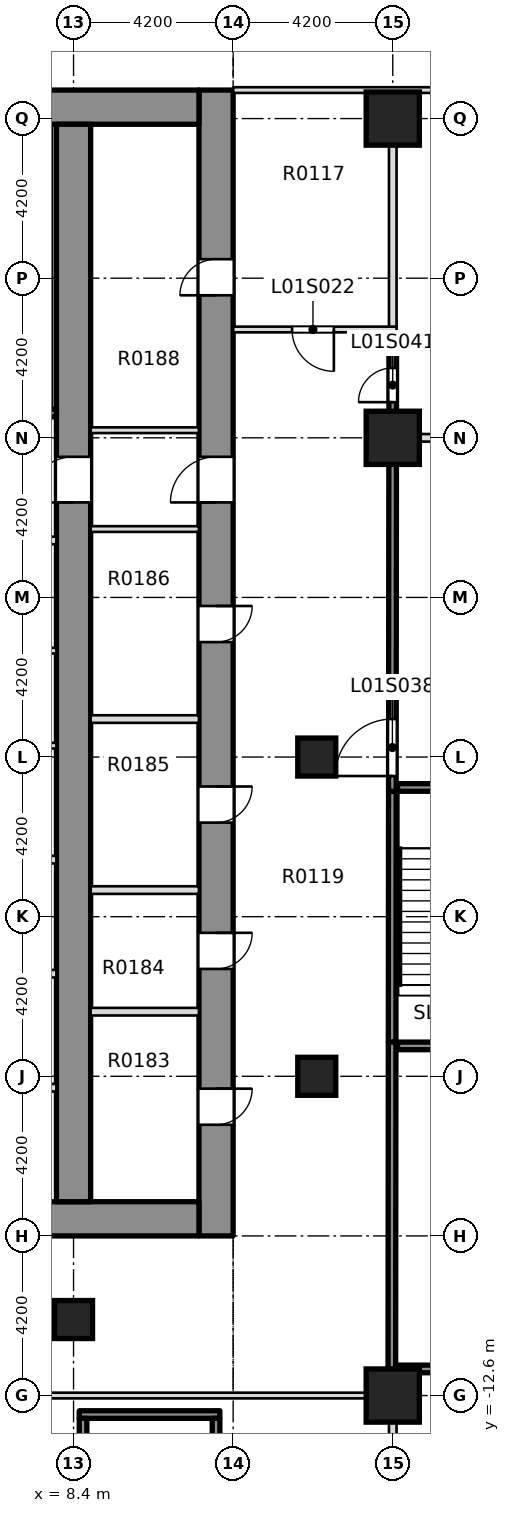
"""IFC4 building model, lengths in metres.
Left out: names, types, materials, properties, quantities, classifications, styles, units other than length and angle.
Written with IfcOpenShell. Run it as: python <this file> out.ifc"""

import sys

from ifc_helpers import new_model, si_unit, direction, frame, frame_2d, origin, origin_2d, place, context, subcontext, project, spatial, rectangle, extrude, element, fill, save


model = new_model("IFC4")
c1 = context("Model", 3, precision=1e-05, world=origin(), true_north=direction((0.0, 1.0)))
c2 = subcontext(c1, "Body", "Model", "MODEL_VIEW")
j1 = project(units=[si_unit("LENGTHUNIT", "METRE"), si_unit("PLANEANGLEUNIT", "RADIAN")], contexts=[c1])
p1 = place(None, origin())
s1 = spatial("IfcSite", under=j1, at=p1, CompositionType="ELEMENT")
p2 = place(p1, origin())
s2 = spatial("IfcBuilding", under=s1, at=p2, CompositionType="ELEMENT")
p3 = place(p2, frame((0.0, 0.0, 7.5)))
s3 = spatial("IfcBuildingStorey", under=s2, at=p3, CompositionType="ELEMENT", Elevation=7.5)
p4 = place(p3, frame((12.15, -8.4, -0.4), z_axis=(0.0, 0.0, 1.0), x_axis=(0.0, 1.0, 0.0)))
e1 = element("IfcWall", 1, at=p4, inside=s3, PredefinedType="SHEAR", context=c2, shape_type="SweptSolid", body=[
    extrude(rectangle(XDim=30.15, YDim=0.9, at=frame_2d((15.075, 0.0))), origin(), (0.0, 0.0, 1.0), 5.0),
])
p5 = place(p4, frame((2.925, 0.0, 0.4)))
e2 = element("IfcOpeningElement", 2, at=p5, cuts=e1, PredefinedType="OPENING", context=c2, shape_type="SweptSolid", body=[
    extrude(rectangle(XDim=0.95, YDim=2.1, at=frame_2d((0.475, 1.05))), frame((0.0, 0.46, 0.0), z_axis=(0.0, -1.0, 0.0), x_axis=(1.0, 0.0, 0.0)), (0.0, 0.0, 1.0), 0.92),
])
p6 = place(p4, frame((7.025, 0.0, 0.4)))
e3 = element("IfcOpeningElement", 3, at=p6, cuts=e1, PredefinedType="OPENING", context=c2, shape_type="SweptSolid", body=[
    extrude(rectangle(XDim=0.95, YDim=2.1, at=frame_2d((0.475, 1.05))), frame((0.0, 0.46, 0.0), z_axis=(0.0, -1.0, 0.0), x_axis=(1.0, 0.0, 0.0)), (0.0, 0.0, 1.0), 0.92),
])
p7 = place(p4, frame((10.875, 0.0, 0.4)))
e4 = element("IfcOpeningElement", 4, at=p7, cuts=e1, PredefinedType="OPENING", context=c2, shape_type="SweptSolid", body=[
    extrude(rectangle(XDim=0.95, YDim=2.1, at=frame_2d((0.475, 1.05))), frame((0.0, 0.46, 0.0), z_axis=(0.0, -1.0, 0.0), x_axis=(1.0, 0.0, 0.0)), (0.0, 0.0, 1.0), 0.92),
])
p8 = place(p4, frame((15.625, 0.0, 0.4)))
e5 = element("IfcOpeningElement", 5, at=p8, cuts=e1, PredefinedType="OPENING", context=c2, shape_type="SweptSolid", body=[
    extrude(rectangle(XDim=0.95, YDim=2.1, at=frame_2d((0.475, 1.05))), frame((0.0, 0.46, 0.0), z_axis=(0.0, -1.0, 0.0), x_axis=(1.0, 0.0, 0.0)), (0.0, 0.0, 1.0), 0.92),
])
p9 = place(p4, frame((24.75, 0.0, 0.4)))
e6 = element("IfcOpeningElement", 6, at=p9, cuts=e1, PredefinedType="OPENING", context=c2, shape_type="SweptSolid", body=[
    extrude(rectangle(XDim=0.95, YDim=2.1, at=frame_2d((0.475, 1.05))), frame((0.0, 0.46, 0.0), z_axis=(0.0, -1.0, 0.0), x_axis=(1.0, 0.0, 0.0)), (0.0, 0.0, 1.0), 0.92),
])
p10 = place(p4, frame((19.3, 0.0, 0.4)))
e7 = element("IfcOpeningElement", 7, at=p10, cuts=e1, PredefinedType="OPENING", context=c2, shape_type="SweptSolid", body=[
    extrude(rectangle(XDim=1.2, YDim=2.1, at=frame_2d((0.6, 1.05))), frame((0.0, 0.46, 0.0), z_axis=(0.0, -1.0, 0.0), x_axis=(1.0, 0.0, 0.0)), (0.0, 0.0, 1.0), 0.92),
])
p11 = place(p3, frame((-11.7, -7.95, -0.4), z_axis=(0.0, 0.0, 1.0), x_axis=(1.0, 0.0, 0.0)))
e8 = element("IfcWall", 8, at=p11, inside=s3, PredefinedType="SHEAR", context=c2, shape_type="SweptSolid", body=[
    extrude(rectangle(XDim=23.4, YDim=0.9, at=frame_2d((11.7, 0.0))), origin(), (0.0, 0.0, 1.0), 5.0),
])
p12 = place(p11, frame((6.95, 0.0, 0.4)))
e9 = element("IfcOpeningElement", 9, at=p12, cuts=e8, PredefinedType="OPENING", context=c2, shape_type="SweptSolid", body=[
    extrude(rectangle(XDim=1.8, YDim=2.1, at=frame_2d((0.9, 1.05))), frame((0.0, 0.46, 0.0), z_axis=(0.0, -1.0, 0.0), x_axis=(1.0, 0.0, 0.0)), (0.0, 0.0, 1.0), 0.92),
])
p13 = place(p11, frame((14.65, 0.0, 0.4)))
e10 = element("IfcOpeningElement", 10, at=p13, cuts=e8, PredefinedType="OPENING", context=c2, shape_type="SweptSolid", body=[
    extrude(rectangle(XDim=1.8, YDim=2.1, at=frame_2d((0.9, 1.05))), frame((0.0, 0.46, 0.0), z_axis=(0.0, -1.0, 0.0), x_axis=(1.0, 0.0, 0.0)), (0.0, 0.0, 1.0), 0.92),
])
p14 = place(p3, frame((-11.7, 21.3, -0.4), z_axis=(0.0, 0.0, 1.0), x_axis=(1.0, 0.0, 0.0)))
e11 = element("IfcWall", 11, at=p14, inside=s3, PredefinedType="SOLIDWALL", context=c2, shape_type="SweptSolid", body=[
    extrude(rectangle(XDim=23.4, YDim=0.9, at=frame_2d((11.7, 0.0))), origin(), (0.0, 0.0, 1.0), 5.0),
])
p15 = place(p3, frame((8.4, -7.5, -0.4), z_axis=(0.0, 0.0, 1.0), x_axis=(0.0, 1.0, 0.0)))
e12 = element("IfcWall", 12, at=p15, inside=s3, PredefinedType="SHEAR", context=c2, shape_type="SweptSolid", body=[
    extrude(rectangle(XDim=28.35, YDim=0.9, at=frame_2d((14.175, 0.0))), origin(), (0.0, 0.0, 1.0), 5.0),
])
p16 = place(p15, frame((18.4, 0.0, 0.4)))
e13 = element("IfcOpeningElement", 13, at=p16, cuts=e12, PredefinedType="OPENING", context=c2, shape_type="SweptSolid", body=[
    extrude(rectangle(XDim=1.2, YDim=2.1, at=frame_2d((0.6, 1.05))), frame((0.0, 0.46, 0.0), z_axis=(0.0, -1.0, 0.0), x_axis=(1.0, 0.0, 0.0)), (0.0, 0.0, 1.0), 0.92),
])
for number, where, z_axis, x_axis in (
    (14, (16.8, -12.6, -0.4), (0.0, 0.0, 1.0), (1.0, 0.0, 0.0)),
    (15, (16.8, 12.6, -0.4), (0.0, 0.0, 1.0), (1.0, 0.0, 0.0)),
    (16, (16.8, 21.0, -0.4), (0.0, 0.0, 1.0), (1.0, 0.0, 0.0)),
):
    element("IfcColumn", number, at=place(p3, frame(where, z_axis=z_axis, x_axis=x_axis)), inside=s3, PredefinedType="COLUMN", context=c2, shape_type="SweptSolid", body=[
        extrude(rectangle(XDim=1.4, YDim=1.4, at=origin_2d()), origin(), (0.0, 0.0, 1.0), 5.0),
    ])
for number, where, z_axis, x_axis in (
    (17, (8.4, -10.6, -0.4), (0.0, 0.0, 1.0), (1.0, 0.0, 0.0)),
    (18, (14.8, -4.2, -0.4), (0.0, 0.0, 1.0), (1.0, 0.0, 0.0)),
    (19, (14.8, 4.2, -0.4), (0.0, 0.0, 1.0), (1.0, 0.0, 0.0)),
):
    element("IfcColumn", number, at=place(p3, frame(where, z_axis=z_axis, x_axis=x_axis)), inside=s3, PredefinedType="COLUMN", context=c2, shape_type="SweptSolid", body=[
        extrude(rectangle(XDim=1.0, YDim=1.0, at=origin_2d()), origin(), (0.0, 0.0, 1.0), 5.0),
    ])
p17 = place(p3, frame((7.275, -12.6, 0.0), z_axis=(0.0, 0.0, 1.0), x_axis=(1.0, 0.0, 0.0)))
e20 = element("IfcWall", 20, at=p17, inside=s3, PredefinedType="PARTITIONING", context=c2, shape_type="SweptSolid", body=[
    extrude(rectangle(XDim=9.625, YDim=0.15, at=frame_2d((4.812, 0.0))), origin(), (0.0, 0.0, 1.0), 4.6),
])
p18 = place(p3, frame((16.875, 12.6, 0.0), z_axis=(0.0, 0.0, 1.0), x_axis=(1.0, 0.0, 0.0)))
e21 = element("IfcWall", 21, at=p18, inside=s3, PredefinedType="PARTITIONING", context=c2, shape_type="SweptSolid", body=[
    extrude(rectangle(XDim=34.075, YDim=0.2, at=frame_2d((17.038, 0.0))), origin(), (0.0, 0.0, 1.0), 4.6),
])
p19 = place(p18, frame((20.025, 0.0, 0.0)))
e22 = element("IfcOpeningElement", 22, at=p19, cuts=e21, PredefinedType="OPENING", context=c2, shape_type="SweptSolid", body=[
    extrude(rectangle(XDim=0.9, YDim=2.1, at=frame_2d((0.45, 1.05))), frame((0.0, 0.11, 0.0), z_axis=(0.0, -1.0, 0.0), x_axis=(1.0, 0.0, 0.0)), (0.0, 0.0, 1.0), 0.22),
])
p20 = place(p3, frame((12.601, 15.45, 0.0), z_axis=(0.0, 0.0, 1.0), x_axis=(1.0, 0.0, 0.0)))
e23 = element("IfcWall", 23, at=p20, inside=s3, PredefinedType="PARTITIONING", context=c2, shape_type="SweptSolid", body=[
    extrude(rectangle(XDim=4.299, YDim=0.15, at=frame_2d((2.149, 0.0))), origin(), (0.0, 0.0, 1.0), 4.6),
])
p21 = place(p20, frame((1.549, 0.0, 0.0)))
e24 = element("IfcOpeningElement", 24, at=p21, cuts=e23, PredefinedType="OPENING", context=c2, shape_type="SweptSolid", body=[
    extrude(rectangle(XDim=1.1, YDim=2.1, at=frame_2d((0.55, 1.05))), frame((0.0, 0.085, 0.0), z_axis=(0.0, -1.0, 0.0), x_axis=(1.0, 0.0, 0.0)), (0.0, 0.0, 1.0), 0.17),
])
p22 = place(p3, frame((12.601, 21.75, 0.0), z_axis=(0.0, 0.0, 1.0), x_axis=(1.0, 0.0, 0.0)))
e25 = element("IfcWall", 25, at=p22, inside=s3, PredefinedType="PARTITIONING", context=c2, shape_type="SweptSolid", body=[
    extrude(rectangle(XDim=21.074, YDim=0.15, at=frame_2d((10.537, 0.0))), origin(), (0.0, 0.0, 1.0), 4.6),
])
p23 = place(p3, frame((16.8, -18.125, 0.0), z_axis=(0.0, 0.0, 1.0), x_axis=(0.0, 1.0, 0.0)))
e26 = element("IfcWall", 26, at=p23, inside=s3, PredefinedType="PARTITIONING", context=c2, shape_type="SweptSolid", body=[
    extrude(rectangle(XDim=5.45, YDim=0.2, at=frame_2d((2.725, 0.0))), origin(), (0.0, 0.0, 1.0), 4.6),
])
p24 = place(p3, frame((16.783, -3.3, 0.0), z_axis=(0.0, 0.0, 1.0), x_axis=(0.000924761016, 0.999999572408, 0.0)))
e27 = element("IfcWall", 27, at=p24, inside=s3, PredefinedType="SOLIDWALL", context=c2, shape_type="SweptSolid", body=[
    extrude(rectangle(XDim=6.6, YDim=0.2, at=frame_2d((3.3, 0.0))), origin(), (0.0, 0.0, 1.0), 4.6),
])
p25 = place(p3, frame((16.8, 15.525, 0.0), z_axis=(0.0, 0.0, 1.0), x_axis=(0.0, 1.0, 0.0)))
e28 = element("IfcWall", 28, at=p25, inside=s3, PredefinedType="PARTITIONING", context=c2, shape_type="SweptSolid", body=[
    extrude(rectangle(XDim=6.15, YDim=0.2, at=frame_2d((3.075, 0.0))), origin(), (0.0, 0.0, 1.0), 4.6),
])
for number, where, z_axis, x_axis in (
    (29, (5.575, -4.5, 0.0), (0.0, 0.0, 1.0), (1.0, 0.0, 0.0)),
    (30, (5.575, -1.5, 0.0), (0.0, 0.0, 1.0), (1.0, 0.0, 0.0)),
    (31, (5.575, 1.5, 0.0), (0.0, 0.0, 1.0), (1.0, 0.0, 0.0)),
):
    element("IfcWall", number, at=place(p3, frame(where, z_axis=z_axis, x_axis=x_axis)), inside=s3, PredefinedType="PARTITIONING", context=c2, shape_type="SweptSolid", body=[
        extrude(rectangle(XDim=2.374, YDim=0.2, at=frame_2d((1.187, 0.0))), origin(), (0.0, 0.0, 1.0), 4.6),
    ])
p26 = place(p3, frame((5.425, 4.5, 0.0), z_axis=(0.0, 0.0, 1.0), x_axis=(1.0, 0.0, 0.0)))
e32 = element("IfcWall", 32, at=p26, inside=s3, PredefinedType="PARTITIONING", context=c2, shape_type="SweptSolid", body=[
    extrude(rectangle(XDim=2.524, YDim=0.15, at=frame_2d((1.262, 0.0))), origin(), (0.0, 0.0, 1.0), 4.6),
])
p27 = place(p3, frame((-7.949, 7.0, 0.0), z_axis=(0.0, 0.0, 1.0), x_axis=(1.0, 0.0, 0.0)))
e33 = element("IfcWall", 33, at=p27, inside=s3, PredefinedType="PARTITIONING", context=c2, shape_type="SweptSolid", body=[
    extrude(rectangle(XDim=15.898, YDim=0.15, at=frame_2d((7.949, 0.0))), origin(), (0.0, 0.0, 1.0), 4.6),
])
p28 = place(p27, frame((7.249, 0.0, 0.0)))
e34 = element("IfcOpeningElement", 34, at=p28, cuts=e33, PredefinedType="OPENING", context=c2, shape_type="SweptSolid", body=[
    extrude(rectangle(XDim=1.4, YDim=2.1, at=frame_2d((0.7, 1.05))), frame((0.0, 0.085, 0.0), z_axis=(0.0, -1.0, 0.0), x_axis=(1.0, 0.0, 0.0)), (0.0, 0.0, 1.0), 0.17),
])
p29 = place(p3, frame((3.6, 9.9, 0.0), z_axis=(0.0, 0.0, 1.0), x_axis=(1.0, 0.0, 0.0)))
e35 = element("IfcWall", 35, at=p29, inside=s3, PredefinedType="PARTITIONING", context=c2, shape_type="SweptSolid", body=[
    extrude(rectangle(XDim=4.349, YDim=0.2, at=frame_2d((2.174, 0.0))), origin(), (0.0, 0.0, 1.0), 4.6),
])
p30 = place(p29, frame((2.25, 0.0, 0.0)))
e36 = element("IfcOpeningElement", 36, at=p30, cuts=e35, PredefinedType="OPENING", context=c2, shape_type="SweptSolid", body=[
    extrude(rectangle(XDim=1.1, YDim=2.1, at=frame_2d((0.55, 1.05))), frame((0.0, 0.11, 0.0), z_axis=(0.0, -1.0, 0.0), x_axis=(1.0, 0.0, 0.0)), (0.0, 0.0, 1.0), 0.22),
])
p31 = place(p3, frame((3.425, 13.25, 0.0), z_axis=(0.0, 0.0, 1.0), x_axis=(1.0, 0.0, 0.0)))
e37 = element("IfcWall", 37, at=p31, inside=s3, PredefinedType="SOLIDWALL", context=c2, shape_type="SweptSolid", body=[
    extrude(rectangle(XDim=4.524, YDim=0.2, at=frame_2d((2.262, 0.0))), origin(), (0.0, 0.0, 1.0), 4.6),
])
p32 = place(p31, frame((1.825, 0.0, 0.0)))
e38 = element("IfcOpeningElement", 38, at=p32, cuts=e37, PredefinedType="OPENING", context=c2, shape_type="SweptSolid", body=[
    extrude(rectangle(XDim=1.2, YDim=2.1, at=frame_2d((0.6, 1.05))), frame((0.0, 0.11, 0.0), z_axis=(0.0, -1.0, 0.0), x_axis=(1.0, 0.0, 0.0)), (0.0, 0.0, 1.0), 0.22),
])
for number, where, z_axis, x_axis in (
    (39, (8.851, -2.5, 0.0), (0.0, 0.0, 1.0), (1.0, 0.0, 0.0)),
    (40, (8.851, 0.7, 0.0), (0.0, 0.0, 1.0), (1.0, 0.0, 0.0)),
    (41, (8.851, 5.2, 0.0), (0.0, 0.0, 1.0), (1.0, 0.0, 0.0)),
):
    element("IfcWall", number, at=place(p3, frame(where, z_axis=z_axis, x_axis=x_axis)), inside=s3, PredefinedType="PARTITIONING", context=c2, shape_type="SweptSolid", body=[
        extrude(rectangle(XDim=2.848, YDim=0.2, at=frame_2d((1.424, 0.0))), origin(), (0.0, 0.0, 1.0), 4.6),
    ])
for number, where, z_axis, x_axis in (
    (42, (8.851, 10.2, 0.0), (0.0, 0.0, 1.0), (1.0, 0.0, 0.0)),
    (43, (8.851, 12.8, 0.0), (0.0, 0.0, 1.0), (1.0, 0.0, 0.0)),
):
    element("IfcWall", number, at=place(p3, frame(where, z_axis=z_axis, x_axis=x_axis)), inside=s3, PredefinedType="PARTITIONING", context=c2, shape_type="SweptSolid", body=[
        extrude(rectangle(XDim=2.848, YDim=0.15, at=frame_2d((1.424, 0.0))), origin(), (0.0, 0.0, 1.0), 4.6),
    ])
p33 = place(p3, frame((8.55, -13.1, 0.0), z_axis=(0.0, 0.0, 1.0), x_axis=(1.0, 0.0, 0.0)))
e44 = element("IfcWall", 44, at=p33, inside=s3, PredefinedType="SOLIDWALL", context=c2, shape_type="SweptSolid", body=[
    extrude(rectangle(XDim=3.7, YDim=0.2, at=frame_2d((1.85, 0.0))), origin(), (0.0, 0.0, 1.0), 4.6),
])
p34 = place(p3, frame((8.65, -20.3, 0.0), z_axis=(0.0, 0.0, 1.0), x_axis=(0.0, 1.0, 0.0)))
e45 = element("IfcWall", 45, at=p34, inside=s3, PredefinedType="SOLIDWALL", context=c2, shape_type="SweptSolid", body=[
    extrude(rectangle(XDim=7.1, YDim=0.2, at=frame_2d((3.55, 0.0))), origin(), (0.0, 0.0, 1.0), 4.6),
])
p35 = place(p3, frame((12.15, -19.8, 0.0), z_axis=(0.0, 0.0, 1.0), x_axis=(0.0, 1.0, 0.0)))
e46 = element("IfcWall", 46, at=p35, inside=s3, PredefinedType="SOLIDWALL", context=c2, shape_type="SweptSolid", body=[
    extrude(rectangle(XDim=6.6, YDim=0.2, at=frame_2d((3.3, 0.0))), origin(), (0.0, 0.0, 1.0), 4.6),
])
for number, where, z_axis, x_axis in (
    (47, (16.925, -3.4, 0.0), (0.0, 0.0, 1.0), (1.0, 0.0, 0.0)),
    (48, (16.925, 3.4, 0.0), (0.0, 0.0, 1.0), (1.0, 0.0, 0.0)),
):
    element("IfcWall", number, at=place(p3, frame(where, z_axis=z_axis, x_axis=x_axis)), inside=s3, PredefinedType="SOLIDWALL", context=c2, shape_type="SweptSolid", body=[
        extrude(rectangle(XDim=3.525, YDim=0.2, at=frame_2d((1.762, 0.0))), origin(), (0.0, 0.0, 1.0), 4.6),
    ])
p36 = place(p3, frame((16.875, -11.9, 0.0), z_axis=(0.0, 0.0, 1.0), x_axis=(1.0, 0.0, 0.0)))
e49 = element("IfcWall", 49, at=p36, inside=s3, PredefinedType="SOLIDWALL", context=c2, shape_type="SweptSolid", body=[
    extrude(rectangle(XDim=34.075, YDim=0.2, at=frame_2d((17.038, 0.0))), origin(), (0.0, 0.0, 1.0), 4.6),
])
p37 = place(p3, frame((16.775, -12.525, 0.0), z_axis=(0.0, 0.0, 1.0), x_axis=(0.000873362112, 0.999999618619, 0.0)))
e50 = element("IfcWall", 50, at=p37, inside=s3, PredefinedType="SOLIDWALL", context=c2, shape_type="SweptSolid", body=[
    extrude(rectangle(XDim=9.225, YDim=0.2, at=frame_2d((4.612, 0.0))), origin(), (0.0, 0.0, 1.0), 4.6),
])
p38 = place(p3, frame((16.789, 3.3, 0.0), z_axis=(0.0, 0.0, 1.0), x_axis=(0.000891463876, 0.999999602646, 0.0)))
e51 = element("IfcWall", 51, at=p38, inside=s3, PredefinedType="SOLIDWALL", context=c2, shape_type="SweptSolid", body=[
    extrude(rectangle(XDim=12.05, YDim=0.2, at=frame_2d((6.025, 0.0))), origin(), (0.0, 0.0, 1.0), 4.6),
])
p39 = place(p38, frame((0.4, 0.0, 0.0)))
e52 = element("IfcOpeningElement", 52, at=p39, cuts=e51, PredefinedType="OPENING", context=c2, shape_type="SweptSolid", body=[
    extrude(rectangle(XDim=1.5, YDim=2.1, at=frame_2d((0.75, 1.05))), frame((0.0, 0.11, 0.0), z_axis=(0.0, -1.0, 0.0), x_axis=(1.0, 0.0, 0.0)), (0.0, 0.0, 1.0), 0.22),
])
p40 = place(p38, frame((10.238, 0.0, 0.0)))
e53 = element("IfcOpeningElement", 53, at=p40, cuts=e51, PredefinedType="OPENING", context=c2, shape_type="SweptSolid", body=[
    extrude(rectangle(XDim=0.9, YDim=2.1, at=frame_2d((0.45, 1.05))), frame((0.0, 0.11, 0.0), z_axis=(0.0, -1.0, 0.0), x_axis=(1.0, 0.0, 0.0)), (0.0, 0.0, 1.0), 0.22),
])
p41 = place(p21, origin())
e54 = element("IfcDoor", 54, at=p41, inside=s3, OperationType="SINGLE_SWING_LEFT", PredefinedType="DOOR", context=c2, shape_type="SweptSolid", body=[
    extrude(rectangle(XDim=1.1, YDim=2.1, at=frame_2d((0.55, 1.05))), frame((0.0, 0.025, 0.0), z_axis=(0.0, -1.0, 0.0), x_axis=(1.0, 0.0, 0.0)), (0.0, 0.0, 1.0), 0.05),
])
fill(e24, e54)
p42 = place(p39, origin())
e55 = element("IfcDoor", 55, at=p42, inside=s3, OperationType="DOUBLE_DOOR_SINGLE_SWING", PredefinedType="DOOR", context=c2, shape_type="SweptSolid", body=[
    extrude(rectangle(XDim=1.5, YDim=2.1, at=frame_2d((0.75, 1.05))), frame((0.0, 0.025, 0.0), z_axis=(0.0, -1.0, 0.0), x_axis=(1.0, 0.0, 0.0)), (0.0, 0.0, 1.0), 0.05),
])
fill(e52, e55)
p43 = place(p40, origin())
e56 = element("IfcDoor", 56, at=p43, inside=s3, OperationType="SINGLE_SWING_LEFT", PredefinedType="DOOR", context=c2, shape_type="SweptSolid", body=[
    extrude(rectangle(XDim=0.9, YDim=2.1, at=frame_2d((0.45, 1.05))), frame((0.0, 0.025, 0.0), z_axis=(0.0, -1.0, 0.0), x_axis=(1.0, 0.0, 0.0)), (0.0, 0.0, 1.0), 0.05),
])
fill(e53, e56)
p44 = place(p5, origin())
e57 = element("IfcDoor", 57, at=p44, inside=s3, OperationType="SINGLE_SWING_LEFT", PredefinedType="DOOR", context=c2, shape_type="SweptSolid", body=[
    extrude(rectangle(XDim=0.95, YDim=2.1, at=frame_2d((0.475, 1.05))), frame((0.0, 0.025, 0.0), z_axis=(0.0, -1.0, 0.0), x_axis=(1.0, 0.0, 0.0)), (0.0, 0.0, 1.0), 0.05),
])
fill(e2, e57)
p45 = place(p6, origin())
e58 = element("IfcDoor", 58, at=p45, inside=s3, OperationType="SINGLE_SWING_LEFT", PredefinedType="DOOR", context=c2, shape_type="SweptSolid", body=[
    extrude(rectangle(XDim=0.95, YDim=2.1, at=frame_2d((0.475, 1.05))), frame((0.0, 0.025, 0.0), z_axis=(0.0, -1.0, 0.0), x_axis=(1.0, 0.0, 0.0)), (0.0, 0.0, 1.0), 0.05),
])
fill(e3, e58)
p46 = place(p7, origin())
e59 = element("IfcDoor", 59, at=p46, inside=s3, OperationType="SINGLE_SWING_LEFT", PredefinedType="DOOR", context=c2, shape_type="SweptSolid", body=[
    extrude(rectangle(XDim=0.95, YDim=2.1, at=frame_2d((0.475, 1.05))), frame((0.0, 0.025, 0.0), z_axis=(0.0, -1.0, 0.0), x_axis=(1.0, 0.0, 0.0)), (0.0, 0.0, 1.0), 0.05),
])
fill(e4, e59)
p47 = place(p8, origin())
e60 = element("IfcDoor", 60, at=p47, inside=s3, OperationType="SINGLE_SWING_LEFT", PredefinedType="DOOR", context=c2, shape_type="SweptSolid", body=[
    extrude(rectangle(XDim=0.95, YDim=2.1, at=frame_2d((0.475, 1.05))), frame((0.0, 0.025, 0.0), z_axis=(0.0, -1.0, 0.0), x_axis=(1.0, 0.0, 0.0)), (0.0, 0.0, 1.0), 0.05),
])
fill(e5, e60)
p48 = place(p9, origin())
e61 = element("IfcDoor", 61, at=p48, inside=s3, OperationType="SINGLE_SWING_LEFT", PredefinedType="DOOR", context=c2, shape_type="SweptSolid", body=[
    extrude(rectangle(XDim=0.95, YDim=2.1, at=frame_2d((0.475, 1.05))), frame((0.0, 0.025, 0.0), z_axis=(0.0, -1.0, 0.0), x_axis=(1.0, 0.0, 0.0)), (0.0, 0.0, 1.0), 0.05),
])
fill(e6, e61)
p49 = place(p10, origin())
e62 = element("IfcDoor", 62, at=p49, inside=s3, OperationType="SINGLE_SWING_LEFT", PredefinedType="DOOR", context=c2, shape_type="SweptSolid", body=[
    extrude(rectangle(XDim=1.2, YDim=2.1, at=frame_2d((0.6, 1.05))), frame((0.0, 0.025, 0.0), z_axis=(0.0, -1.0, 0.0), x_axis=(1.0, 0.0, 0.0)), (0.0, 0.0, 1.0), 0.05),
])
fill(e7, e62)
p50 = place(p16, origin())
e63 = element("IfcDoor", 63, at=p50, inside=s3, OperationType="SINGLE_SWING_LEFT", PredefinedType="DOOR", context=c2, shape_type="SweptSolid", body=[
    extrude(rectangle(XDim=1.2, YDim=2.1, at=frame_2d((0.6, 1.05))), frame((0.0, 0.025, 0.0), z_axis=(0.0, -1.0, 0.0), x_axis=(1.0, 0.0, 0.0)), (0.0, 0.0, 1.0), 0.05),
])
fill(e13, e63)
save(model, sys.argv[1])
